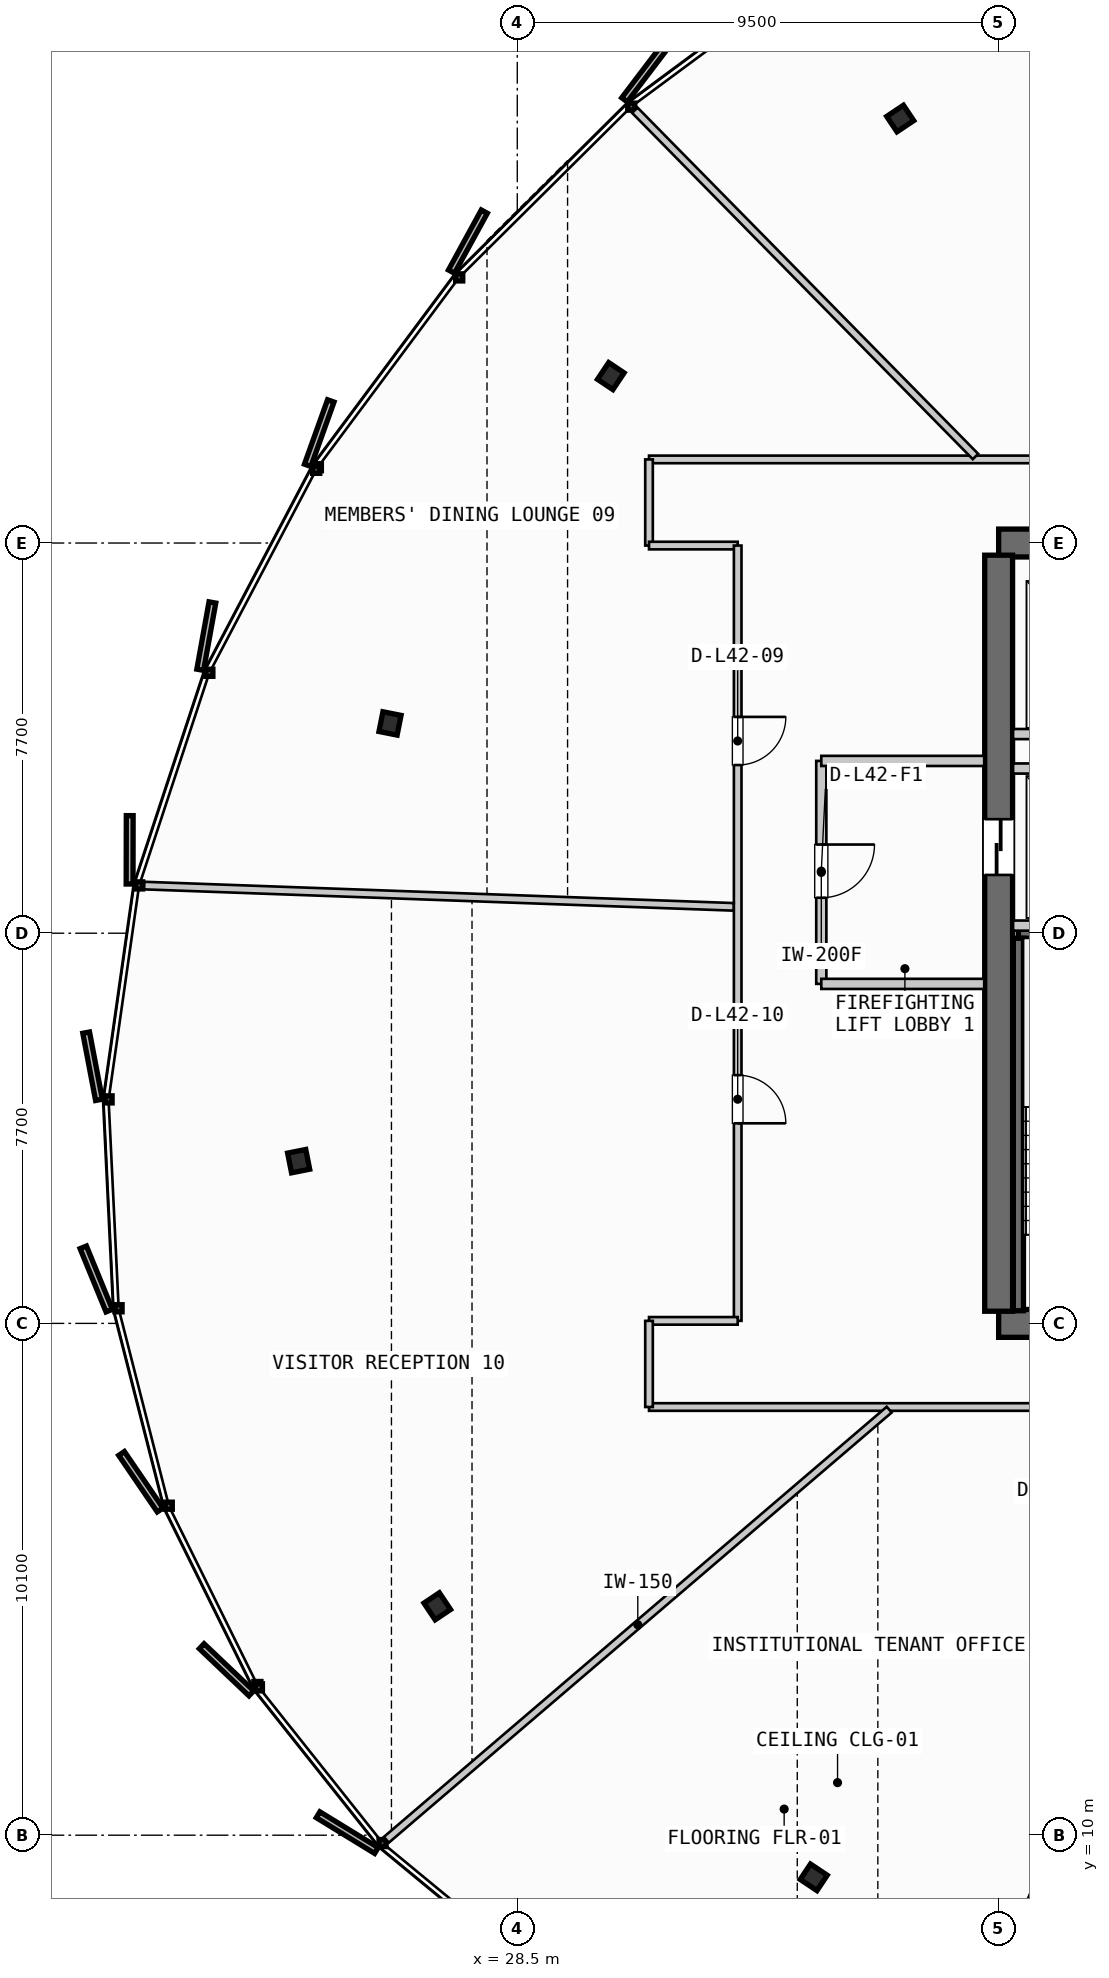
"""IFC4 building model, lengths in metres.
Left out: names, types, materials, properties, quantities, classifications, styles, units other than length and angle.
Written with IfcOpenShell. Run it as: python <this file> out.ifc"""

import sys

from ifc_helpers import new_model, si_unit, direction, frame, frame_2d, origin, origin_2d, place, context, subcontext, project, spatial, rectangle, i_section, extrude, source, transform, mapped, element, fill, save


model = new_model("IFC4")
c1 = context("Model", 3, precision=1e-05, world=origin(), true_north=direction((0.0, 1.0)))
c2 = subcontext(c1, "Body", "Model", "MODEL_VIEW")
j1 = project(units=[si_unit("LENGTHUNIT", "METRE"), si_unit("PLANEANGLEUNIT", "RADIAN")], contexts=[c1])
p1 = place(None, origin())
s1 = spatial("IfcSite", under=j1, at=p1, CompositionType="ELEMENT")
p2 = place(p1, origin())
s2 = spatial("IfcBuilding", under=s1, at=p2, CompositionType="ELEMENT")
p3 = place(p2, frame((0.0, 0.0, 164.3)))
s3 = spatial("IfcBuildingStorey", under=s2, at=p3, CompositionType="ELEMENT", Elevation=164.3)
p4 = place(p3, frame((38.0, 20.1, 0.0), z_axis=(0.0, 0.0, 1.0), x_axis=(1.0, 0.0, 0.0)))
e1 = element("IfcWall", 1, at=p4, inside=s3, PredefinedType="SHEAR", context=c2, shape_type="SweptSolid", body=[
    extrude(rectangle(XDim=17.6, YDim=0.55, at=frame_2d((8.8, 0.0))), origin(), (0.0, 0.0, 1.0), 3.3),
])
p5 = place(p4, frame((1.4, 0.0, 0.0)))
e2 = element("IfcOpeningElement", 2, at=p5, cuts=e1, PredefinedType="OPENING", context=c2, shape_type="SweptSolid", body=[
    extrude(rectangle(XDim=1.05, YDim=2.15, at=frame_2d((0.525, 1.075))), frame((0.0, 0.285, 0.0), z_axis=(0.0, -1.0, 0.0), x_axis=(1.0, 0.0, 0.0)), (0.0, 0.0, 1.0), 0.57),
])
p6 = place(p4, frame((15.15, 0.0, 0.0)))
e3 = element("IfcOpeningElement", 3, at=p6, cuts=e1, PredefinedType="OPENING", context=c2, shape_type="SweptSolid", body=[
    extrude(rectangle(XDim=1.05, YDim=2.15, at=frame_2d((0.525, 1.075))), frame((0.0, 0.285, 0.0), z_axis=(0.0, -1.0, 0.0), x_axis=(1.0, 0.0, 0.0)), (0.0, 0.0, 1.0), 0.57),
])
p7 = place(p4, frame((5.25, 0.0, 0.0)))
e4 = element("IfcOpeningElement", 4, at=p7, cuts=e1, PredefinedType="OPENING", context=c2, shape_type="SweptSolid", body=[
    extrude(rectangle(XDim=0.95, YDim=2.15, at=frame_2d((0.475, 1.075))), frame((0.0, 0.285, 0.0), z_axis=(0.0, -1.0, 0.0), x_axis=(1.0, 0.0, 0.0)), (0.0, 0.0, 1.0), 0.57),
])
p8 = place(p4, frame((11.4, 0.0, 0.0)))
e5 = element("IfcOpeningElement", 5, at=p8, cuts=e1, PredefinedType="OPENING", context=c2, shape_type="SweptSolid", body=[
    extrude(rectangle(XDim=0.95, YDim=2.15, at=frame_2d((0.475, 1.075))), frame((0.0, 0.285, 0.0), z_axis=(0.0, -1.0, 0.0), x_axis=(1.0, 0.0, 0.0)), (0.0, 0.0, 1.0), 0.57),
])
p9 = place(p3, frame((55.6, 35.5, 0.0), z_axis=(0.0, 0.0, 1.0), x_axis=(-1.0, 0.0, 0.0)))
e6 = element("IfcWall", 6, at=p9, inside=s3, PredefinedType="SHEAR", context=c2, shape_type="SweptSolid", body=[
    extrude(rectangle(XDim=17.6, YDim=0.55, at=frame_2d((8.8, 0.0))), origin(), (0.0, 0.0, 1.0), 3.3),
])
p10 = place(p9, frame((8.05, 0.0, 0.0)))
e7 = element("IfcOpeningElement", 7, at=p10, cuts=e6, PredefinedType="OPENING", context=c2, shape_type="SweptSolid", body=[
    extrude(rectangle(XDim=1.5, YDim=2.2, at=frame_2d((0.75, 1.1))), frame((0.0, 0.285, 0.0), z_axis=(0.0, -1.0, 0.0), x_axis=(1.0, 0.0, 0.0)), (0.0, 0.0, 1.0), 0.57),
])
p11 = place(p9, frame((14.95, 0.0, 0.0)))
e8 = element("IfcOpeningElement", 8, at=p11, cuts=e6, PredefinedType="OPENING", context=c2, shape_type="SweptSolid", body=[
    extrude(rectangle(XDim=1.4, YDim=2.3, at=frame_2d((0.7, 1.15))), frame((0.0, 0.285, 0.0), z_axis=(0.0, -1.0, 0.0), x_axis=(1.0, 0.0, 0.0)), (0.0, 0.0, 1.0), 0.57),
])
p12 = place(p9, frame((12.3, 0.0, 0.0)))
e9 = element("IfcOpeningElement", 9, at=p12, cuts=e6, PredefinedType="OPENING", context=c2, shape_type="SweptSolid", body=[
    extrude(rectangle(XDim=0.95, YDim=2.15, at=frame_2d((0.475, 1.075))), frame((0.0, 0.285, 0.0), z_axis=(0.0, -1.0, 0.0), x_axis=(1.0, 0.0, 0.0)), (0.0, 0.0, 1.0), 0.57),
])
p13 = place(p9, frame((10.2, 0.0, 0.0)))
e10 = element("IfcOpeningElement", 10, at=p13, cuts=e6, PredefinedType="OPENING", context=c2, shape_type="SweptSolid", body=[
    extrude(rectangle(XDim=0.9, YDim=2.15, at=frame_2d((0.45, 1.075))), frame((0.0, 0.285, 0.0), z_axis=(0.0, -1.0, 0.0), x_axis=(1.0, 0.0, 0.0)), (0.0, 0.0, 1.0), 0.57),
])
p14 = place(p3, frame((38.0, 35.26, 0.0), z_axis=(0.0, 0.0, 1.0), x_axis=(0.0, -1.0, 0.0)))
e11 = element("IfcWall", 11, at=p14, inside=s3, PredefinedType="SHEAR", context=c2, shape_type="SweptSolid", body=[
    extrude(rectangle(XDim=14.92, YDim=0.55, at=frame_2d((7.46, 0.0))), origin(), (0.0, 0.0, 1.0), 3.3),
])
p15 = place(p14, frame((5.21, 0.0, 0.0)))
e12 = element("IfcOpeningElement", 12, at=p15, cuts=e11, PredefinedType="OPENING", context=c2, shape_type="SweptSolid", body=[
    extrude(rectangle(XDim=1.1, YDim=2.2, at=frame_2d((0.55, 1.1))), frame((0.0, 0.285, 0.0), z_axis=(0.0, -1.0, 0.0), x_axis=(1.0, 0.0, 0.0)), (0.0, 0.0, 1.0), 0.57),
])
m1 = source(origin(), c2, "Body", "SweptSolid", [
    extrude(i_section(OverallWidth=0.397, OverallDepth=0.365, WebThickness=0.028, FlangeThickness=0.044, FilletRadius=0.015, at=origin_2d()), origin(), (0.0, 0.0, 1.0), 3.3),
])
for number, where, z_axis, x_axis in (
    (13, (36.058, 43.877, 0.0), (0.0, 0.0, 1.0), (-0.556, 0.831, 0.0)),
    (14, (30.346, 38.794, 0.0), (0.0, 0.0, 1.0), (-0.831, 0.556, 0.0)),
    (15, (25.989, 31.94, 0.0), (0.0, 0.0, 1.0), (-0.981, 0.195, 0.0)),
    (16, (24.185, 23.302, 0.0), (0.0, 0.0, 1.0), (-0.981, -0.195, 0.0)),
    (17, (26.921, 14.517, 0.0), (0.0, 0.0, 1.0), (-0.831, -0.556, 0.0)),
    (18, (34.351, 9.168, 0.0), (0.0, 0.0, 1.0), (-0.556, -0.831, 0.0)),
):
    element("IfcColumn", number, at=place(p3, frame(where, z_axis=z_axis, x_axis=x_axis)), inside=s3, PredefinedType="COLUMN", context=c2, shape_type="MappedRepresentation", body=[
        mapped(m1, transform((0.0, 0.0, 0.0), scale=1.0)),
    ])
p16 = place(p3, frame((38.39, 27.8, 0.0), z_axis=(0.0, 0.0, 1.0), x_axis=(1.0, 0.0, 0.0)))
e19 = element("IfcWall", 19, at=p16, inside=s3, PredefinedType="SHEAR", context=c2, shape_type="SweptSolid", body=[
    extrude(rectangle(XDim=3.06, YDim=0.2, at=frame_2d((1.53, 0.0))), origin(), (0.0, 0.0, 1.0), 3.3),
])
p17 = place(p3, frame((38.39, 20.35, 0.0), z_axis=(0.0, 0.0, 1.0), x_axis=(0.0, 1.0, 0.0)))
e20 = element("IfcWall", 20, at=p17, inside=s3, PredefinedType="SHEAR", context=c2, shape_type="SweptSolid", body=[
    extrude(rectangle(XDim=7.35, YDim=0.2, at=frame_2d((3.675, 0.0))), origin(), (0.0, 0.0, 1.0), 3.3),
])
for number, where, z_axis, x_axis in (
    (21, (38.285, 27.95, 0.0), (0.0, 0.0, 1.0), (1.0, 0.0, 0.0)),
    (22, (38.285, 31.05, 0.0), (0.0, 0.0, 1.0), (1.0, 0.0, 0.0)),
):
    element("IfcWall", number, at=place(p3, frame(where, z_axis=z_axis, x_axis=x_axis)), inside=s3, PredefinedType="PARTITIONING", context=c2, shape_type="SweptSolid", body=[
        extrude(rectangle(XDim=2.865, YDim=0.2, at=frame_2d((1.433, 0.0))), origin(), (0.0, 0.0, 1.0), 2.28),
    ])
p18 = place(p3, frame((34.5, 31.2, 0.0), z_axis=(0.0, 0.0, 1.0), x_axis=(0.0, -1.0, 0.0)))
e23 = element("IfcWall", 23, at=p18, inside=s3, PredefinedType="PARTITIONING", context=c2, shape_type="SweptSolid", body=[
    extrude(rectangle(XDim=4.4, YDim=0.2, at=frame_2d((2.2, 0.0))), origin(), (0.0, 0.0, 1.0), 2.28),
])
p19 = place(p18, frame((1.65, 0.0, 0.0)))
e24 = element("IfcOpeningElement", 24, at=p19, cuts=e23, PredefinedType="OPENING", context=c2, shape_type="SweptSolid", body=[
    extrude(rectangle(XDim=1.05, YDim=2.15, at=frame_2d((0.525, 1.075))), frame((0.0, 0.11, 0.0), z_axis=(0.0, -1.0, 0.0), x_axis=(1.0, 0.0, 0.0)), (0.0, 0.0, 1.0), 0.22),
])
for number, where, z_axis, x_axis in (
    (25, (34.5, 26.8, 0.0), (0.0, 0.0, 1.0), (1.0, 0.0, 0.0)),
    (26, (34.5, 31.2, 0.0), (0.0, 0.0, 1.0), (1.0, 0.0, 0.0)),
):
    element("IfcWall", number, at=place(p3, frame(where, z_axis=z_axis, x_axis=x_axis)), inside=s3, PredefinedType="PARTITIONING", context=c2, shape_type="SweptSolid", body=[
        extrude(rectangle(XDim=3.215, YDim=0.2, at=frame_2d((1.607, 0.0))), origin(), (0.0, 0.0, 1.0), 2.28),
    ])
p20 = place(p3, frame((38.285, 31.73, 0.0), z_axis=(0.0, 0.0, 1.0), x_axis=(1.0, 0.0, 0.0)))
e27 = element("IfcWall", 27, at=p20, inside=s3, PredefinedType="PARTITIONING", context=c2, shape_type="SweptSolid", body=[
    extrude(rectangle(XDim=7.515, YDim=0.2, at=frame_2d((3.758, 0.0))), origin(), (0.0, 0.0, 1.0), 2.28),
])
p21 = place(p3, frame((31.1, 18.45, 0.0), z_axis=(0.0, 0.0, 1.0), x_axis=(1.0, 0.0, 0.0)))
e28 = element("IfcWall", 28, at=p21, inside=s3, PredefinedType="PARTITIONING", context=c2, shape_type="SweptSolid", body=[
    extrude(rectangle(XDim=31.4, YDim=0.15, at=frame_2d((15.7, 0.0))), origin(), (0.0, 0.0, 1.0), 2.28),
])
p22 = place(p21, frame((7.708, 0.0, 0.0)))
e29 = element("IfcOpeningElement", 29, at=p22, cuts=e28, PredefinedType="OPENING", context=c2, shape_type="SweptSolid", body=[
    extrude(rectangle(XDim=0.95, YDim=2.15, at=frame_2d((0.475, 1.075))), frame((0.0, 0.085, 0.0), z_axis=(0.0, -1.0, 0.0), x_axis=(1.0, 0.0, 0.0)), (0.0, 0.0, 1.0), 0.17),
])
p23 = place(p21, frame((14.956, 0.0, 0.0)))
e30 = element("IfcOpeningElement", 30, at=p23, cuts=e28, PredefinedType="OPENING", context=c2, shape_type="SweptSolid", body=[
    extrude(rectangle(XDim=0.95, YDim=2.15, at=frame_2d((0.475, 1.075))), frame((0.0, 0.085, 0.0), z_axis=(0.0, -1.0, 0.0), x_axis=(1.0, 0.0, 0.0)), (0.0, 0.0, 1.0), 0.17),
])
p24 = place(p21, frame((21.632, 0.0, 0.0)))
e31 = element("IfcOpeningElement", 31, at=p24, cuts=e28, PredefinedType="OPENING", context=c2, shape_type="SweptSolid", body=[
    extrude(rectangle(XDim=0.95, YDim=2.15, at=frame_2d((0.475, 1.075))), frame((0.0, 0.085, 0.0), z_axis=(0.0, -1.0, 0.0), x_axis=(1.0, 0.0, 0.0)), (0.0, 0.0, 1.0), 0.17),
])
p25 = place(p3, frame((62.5, 37.15, 0.0), z_axis=(0.0, 0.0, 1.0), x_axis=(-1.0, 0.0, 0.0)))
e32 = element("IfcWall", 32, at=p25, inside=s3, PredefinedType="PARTITIONING", context=c2, shape_type="SweptSolid", body=[
    extrude(rectangle(XDim=31.4, YDim=0.15, at=frame_2d((15.7, 0.0))), origin(), (0.0, 0.0, 1.0), 2.28),
])
p26 = place(p25, frame((1.984, 0.0, 0.0)))
e33 = element("IfcOpeningElement", 33, at=p26, cuts=e32, PredefinedType="OPENING", context=c2, shape_type="SweptSolid", body=[
    extrude(rectangle(XDim=0.95, YDim=2.15, at=frame_2d((0.475, 1.075))), frame((0.0, 0.085, 0.0), z_axis=(0.0, -1.0, 0.0), x_axis=(1.0, 0.0, 0.0)), (0.0, 0.0, 1.0), 0.17),
])
p27 = place(p25, frame((8.15, 0.0, 0.0)))
e34 = element("IfcOpeningElement", 34, at=p27, cuts=e32, PredefinedType="OPENING", context=c2, shape_type="SweptSolid", body=[
    extrude(rectangle(XDim=0.95, YDim=2.15, at=frame_2d((0.475, 1.075))), frame((0.0, 0.085, 0.0), z_axis=(0.0, -1.0, 0.0), x_axis=(1.0, 0.0, 0.0)), (0.0, 0.0, 1.0), 0.17),
])
p28 = place(p25, frame((18.562, 0.0, 0.0)))
e35 = element("IfcOpeningElement", 35, at=p28, cuts=e32, PredefinedType="OPENING", context=c2, shape_type="SweptSolid", body=[
    extrude(rectangle(XDim=0.95, YDim=2.15, at=frame_2d((0.475, 1.075))), frame((0.0, 0.085, 0.0), z_axis=(0.0, -1.0, 0.0), x_axis=(1.0, 0.0, 0.0)), (0.0, 0.0, 1.0), 0.17),
])
p29 = place(p3, frame((31.1, 37.15, 0.0), z_axis=(0.0, 0.0, 1.0), x_axis=(0.0, -1.0, 0.0)))
e36 = element("IfcWall", 36, at=p29, inside=s3, PredefinedType="PARTITIONING", context=c2, shape_type="SweptSolid", body=[
    extrude(rectangle(XDim=1.7, YDim=0.15, at=frame_2d((0.85, 0.0))), origin(), (0.0, 0.0, 1.0), 2.28),
])
p30 = place(p3, frame((31.1, 35.45, 0.0), z_axis=(0.0, 0.0, 1.0), x_axis=(1.0, 0.0, 0.0)))
e37 = element("IfcWall", 37, at=p30, inside=s3, PredefinedType="PARTITIONING", context=c2, shape_type="SweptSolid", body=[
    extrude(rectangle(XDim=1.75, YDim=0.15, at=frame_2d((0.875, 0.0))), origin(), (0.0, 0.0, 1.0), 2.28),
])
p31 = place(p3, frame((32.85, 35.45, 0.0), z_axis=(0.0, 0.0, 1.0), x_axis=(0.0, -1.0, 0.0)))
e38 = element("IfcWall", 38, at=p31, inside=s3, PredefinedType="PARTITIONING", context=c2, shape_type="SweptSolid", body=[
    extrude(rectangle(XDim=15.3, YDim=0.15, at=frame_2d((7.65, 0.0))), origin(), (0.0, 0.0, 1.0), 2.28),
])
p32 = place(p31, frame((3.381, 0.0, 0.0)))
e39 = element("IfcOpeningElement", 39, at=p32, cuts=e38, PredefinedType="OPENING", context=c2, shape_type="SweptSolid", body=[
    extrude(rectangle(XDim=0.95, YDim=2.15, at=frame_2d((0.475, 1.075))), frame((0.0, 0.085, 0.0), z_axis=(0.0, -1.0, 0.0), x_axis=(1.0, 0.0, 0.0)), (0.0, 0.0, 1.0), 0.17),
])
p33 = place(p31, frame((10.451, 0.0, 0.0)))
e40 = element("IfcOpeningElement", 40, at=p33, cuts=e38, PredefinedType="OPENING", context=c2, shape_type="SweptSolid", body=[
    extrude(rectangle(XDim=0.95, YDim=2.15, at=frame_2d((0.475, 1.075))), frame((0.0, 0.085, 0.0), z_axis=(0.0, -1.0, 0.0), x_axis=(1.0, 0.0, 0.0)), (0.0, 0.0, 1.0), 0.17),
])
p34 = place(p3, frame((32.85, 20.15, 0.0), z_axis=(0.0, 0.0, 1.0), x_axis=(-1.0, 0.0, 0.0)))
e41 = element("IfcWall", 41, at=p34, inside=s3, PredefinedType="PARTITIONING", context=c2, shape_type="SweptSolid", body=[
    extrude(rectangle(XDim=1.75, YDim=0.15, at=frame_2d((0.875, 0.0))), origin(), (0.0, 0.0, 1.0), 2.28),
])
p35 = place(p3, frame((31.1, 20.15, 0.0), z_axis=(0.0, 0.0, 1.0), x_axis=(0.0, -1.0, 0.0)))
e42 = element("IfcWall", 42, at=p35, inside=s3, PredefinedType="PARTITIONING", context=c2, shape_type="SweptSolid", body=[
    extrude(rectangle(XDim=1.7, YDim=0.15, at=frame_2d((0.85, 0.0))), origin(), (0.0, 0.0, 1.0), 2.28),
])
p36 = place(p3, frame((35.84, 18.398, 0.0), z_axis=(0.0, 0.0, 1.0), x_axis=(-0.759925304689, -0.650010408604, 0.0)))
e43 = element("IfcWall", 43, at=p36, inside=s3, PredefinedType="PARTITIONING", context=c2, shape_type="SweptSolid", body=[
    extrude(rectangle(XDim=13.058, YDim=0.15, at=frame_2d((6.529, 0.0))), origin(), (0.0, 0.0, 1.0), 2.28),
])
p37 = place(p3, frame((42.785, 18.376, 0.0), z_axis=(0.0, 0.0, 1.0), x_axis=(-0.393766631536, -0.919210443744, 0.0)))
e44 = element("IfcWall", 44, at=p37, inside=s3, PredefinedType="PARTITIONING", context=c2, shape_type="SweptSolid", body=[
    extrude(rectangle(XDim=15.441, YDim=0.15, at=frame_2d((7.72, 0.0))), origin(), (0.0, 0.0, 1.0), 2.28),
])
p38 = place(p3, frame((37.543, 37.207, 0.0), z_axis=(0.0, 0.0, 1.0), x_axis=(-0.701353343618, 0.71281378171, 0.0)))
e45 = element("IfcWall", 45, at=p38, inside=s3, PredefinedType="PARTITIONING", context=c2, shape_type="SweptSolid", body=[
    extrude(rectangle(XDim=9.586, YDim=0.15, at=frame_2d((4.793, 0.0))), origin(), (0.0, 0.0, 1.0), 2.28),
])
p39 = place(p3, frame((32.77, 28.32, 0.0), z_axis=(0.0, 0.0, 1.0), x_axis=(-0.999349128656, 0.036073800107, 0.0)))
e46 = element("IfcWall", 46, at=p39, inside=s3, PredefinedType="PARTITIONING", context=c2, shape_type="SweptSolid", body=[
    extrude(rectangle(XDim=11.641, YDim=0.15, at=frame_2d((5.82, 0.0))), origin(), (0.0, 0.0, 1.0), 2.28),
])
m2 = source(origin(), c2, "Body", "SweptSolid", [
    extrude(rectangle(XDim=1.1, YDim=2.2, at=frame_2d((0.55, 1.1))), frame((0.0, 0.025, 0.0), z_axis=(0.0, -1.0, 0.0), x_axis=(1.0, 0.0, 0.0)), (0.0, 0.0, 1.0), 0.05),
])
p40 = place(p15, origin())
e47 = element("IfcDoor", 47, at=p40, inside=s3, OperationType="SLIDING_TO_LEFT", PredefinedType="DOOR", context=c2, shape_type="MappedRepresentation", body=[
    mapped(m2, transform((0.0, 0.0, 0.0), scale=1.0)),
])
fill(e12, e47)
m3 = source(origin(), c2, "Body", "SweptSolid", [
    extrude(rectangle(XDim=1.05, YDim=2.15, at=frame_2d((0.525, 1.075))), frame((0.0, 0.025, 0.0), z_axis=(0.0, -1.0, 0.0), x_axis=(1.0, 0.0, 0.0)), (0.0, 0.0, 1.0), 0.05),
])
p41 = place(p19, origin())
e48 = element("IfcDoor", 48, at=p41, inside=s3, OperationType="SINGLE_SWING_LEFT", PredefinedType="DOOR", context=c2, shape_type="MappedRepresentation", body=[
    mapped(m3, transform((0.0, 0.0, 0.0), scale=1.0)),
])
fill(e24, e48)
m4 = source(origin(), c2, "Body", "SweptSolid", [
    extrude(rectangle(XDim=0.95, YDim=2.15, at=frame_2d((0.475, 1.075))), frame((0.0, 0.025, 0.0), z_axis=(0.0, -1.0, 0.0), x_axis=(1.0, 0.0, 0.0)), (0.0, 0.0, 1.0), 0.05),
])
p42 = place(p32, origin())
e49 = element("IfcDoor", 49, at=p42, inside=s3, OperationType="SINGLE_SWING_LEFT", PredefinedType="DOOR", context=c2, shape_type="MappedRepresentation", body=[
    mapped(m4, transform((0.0, 0.0, 0.0), scale=1.0)),
])
fill(e39, e49)
p43 = place(p33, origin())
e50 = element("IfcDoor", 50, at=p43, inside=s3, OperationType="SINGLE_SWING_RIGHT", PredefinedType="DOOR", context=c2, shape_type="MappedRepresentation", body=[
    mapped(m4, transform((0.0, 0.0, 0.0), scale=1.0)),
])
fill(e40, e50)
save(model, sys.argv[1])
